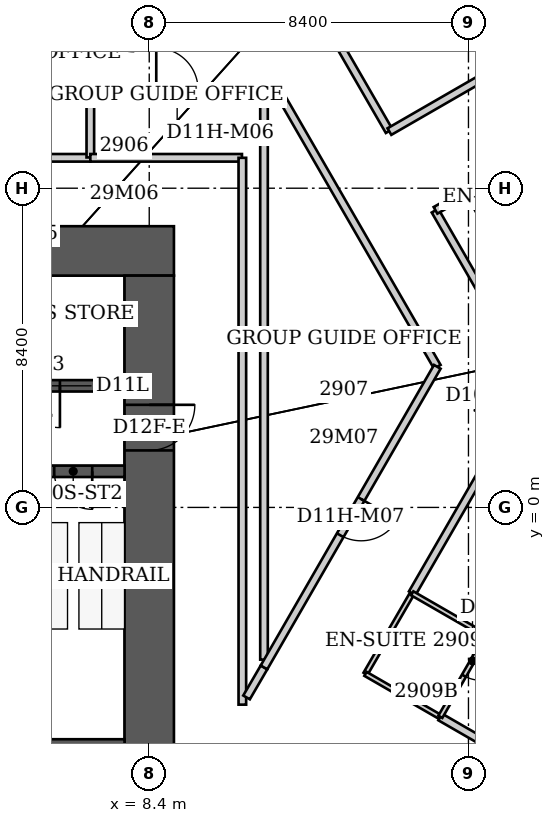
"""IFC4 building model, lengths in metres.
Left out: names, types, materials, properties, quantities, classifications, styles, units other than length and angle.
Written with IfcOpenShell. Run it as: python <this file> out.ifc"""

import sys

from ifc_helpers import new_model, si_unit, direction, frame, frame_2d, origin, place, context, subcontext, project, spatial, rectangle, extrude, element, fill, save


model = new_model("IFC4")
c1 = context("Model", 3, precision=1e-05, world=origin(), true_north=direction((0.0, 1.0)))
c2 = subcontext(c1, "Body", "Model", "MODEL_VIEW")
j1 = project(units=[si_unit("LENGTHUNIT", "METRE"), si_unit("PLANEANGLEUNIT", "RADIAN")], contexts=[c1])
p1 = place(None, origin())
s1 = spatial("IfcSite", under=j1, at=p1, CompositionType="ELEMENT")
p2 = place(p1, origin())
s2 = spatial("IfcBuilding", under=s1, at=p2, CompositionType="ELEMENT")
p3 = place(p2, frame((0.0, 0.0, 119.6)))
s3 = spatial("IfcBuildingStorey", under=s2, at=p3, CompositionType="ELEMENT", Elevation=119.6)
p4 = place(p3, frame((-9.05, 6.75, 0.0), z_axis=(0.0, 0.0, 1.0), x_axis=(1.0, 0.0, 0.0)))
e1 = element("IfcWall", 1, at=p4, inside=s3, PredefinedType="SHEAR", context=c2, shape_type="SweptSolid", body=[
    extrude(rectangle(XDim=18.1, YDim=1.3, at=frame_2d((9.05, 0.0))), origin(), (0.0, 0.0, 1.0), 3.8),
])
p5 = place(p3, frame((8.4, -9.2, 0.0), z_axis=(0.0, 0.0, 1.0), x_axis=(0.0, 1.0, 0.0)))
e2 = element("IfcWall", 2, at=p5, inside=s3, PredefinedType="SHEAR", context=c2, shape_type="SweptSolid", body=[
    extrude(rectangle(XDim=15.3, YDim=1.3, at=frame_2d((7.65, 0.0))), origin(), (0.0, 0.0, 1.0), 3.8),
])
p6 = place(p5, frame((10.7, 0.0, 0.0)))
e3 = element("IfcOpeningElement", 3, at=p6, cuts=e2, PredefinedType="OPENING", context=c2, shape_type="SweptSolid", body=[
    extrude(rectangle(XDim=1.2, YDim=2.2, at=frame_2d((0.6, 1.1))), frame((0.0, 0.65, 0.0), z_axis=(0.0, -1.0, 0.0), x_axis=(1.0, 0.0, 0.0)), (0.0, 0.0, 1.0), 1.3),
])
p7 = place(p3, frame((-7.75, -6.5, 0.0), z_axis=(0.0, 0.0, 1.0), x_axis=(1.0, 0.0, 0.0)))
e4 = element("IfcWall", 4, at=p7, inside=s3, PredefinedType="SHEAR", context=c2, shape_type="SweptSolid", body=[
    extrude(rectangle(XDim=15.5, YDim=0.8, at=frame_2d((7.75, 0.0))), origin(), (0.0, 0.0, 1.0), 3.8),
])
p8 = place(p3, frame((4.75, 0.95, 0.0), z_axis=(0.0, 0.0, 1.0), x_axis=(1.0, 0.0, 0.0)))
e5 = element("IfcWall", 5, at=p8, inside=s3, PredefinedType="SHEAR", context=c2, shape_type="SweptSolid", body=[
    extrude(rectangle(XDim=3.0, YDim=0.3, at=frame_2d((1.5, 0.0))), origin(), (0.0, 0.0, 1.0), 3.8),
])
p9 = place(p8, frame((1.15, 0.0, 0.0)))
e6 = element("IfcOpeningElement", 6, at=p9, cuts=e5, PredefinedType="OPENING", context=c2, shape_type="SweptSolid", body=[
    extrude(rectangle(XDim=1.0, YDim=2.2, at=frame_2d((0.5, 1.1))), frame((0.0, 0.15, 0.0), z_axis=(0.0, -1.0, 0.0), x_axis=(1.0, 0.0, 0.0)), (0.0, 0.0, 1.0), 0.3),
])
p10 = place(p3, frame((-7.75, 3.2, 0.0), z_axis=(0.0, 0.0, 1.0), x_axis=(1.0, 0.0, 0.0)))
e7 = element("IfcWall", 7, at=p10, inside=s3, PredefinedType="SHEAR", context=c2, shape_type="SweptSolid", body=[
    extrude(rectangle(XDim=15.5, YDim=0.3, at=frame_2d((7.75, 0.0))), origin(), (0.0, 0.0, 1.0), 3.8),
])
p11 = place(p10, frame((5.887, 0.0, 0.0)))
e8 = element("IfcOpeningElement", 8, at=p11, cuts=e7, PredefinedType="OPENING", context=c2, shape_type="SweptSolid", body=[
    extrude(rectangle(XDim=1.1, YDim=2.2, at=frame_2d((0.55, 1.1))), frame((0.0, 0.15, 0.0), z_axis=(0.0, -1.0, 0.0), x_axis=(1.0, 0.0, 0.0)), (0.0, 0.0, 1.0), 0.3),
])
p12 = place(p10, frame((8.812, 0.0, 0.0)))
e9 = element("IfcOpeningElement", 9, at=p12, cuts=e7, PredefinedType="OPENING", context=c2, shape_type="SweptSolid", body=[
    extrude(rectangle(XDim=1.1, YDim=2.2, at=frame_2d((0.55, 1.1))), frame((0.0, 0.15, 0.0), z_axis=(0.0, -1.0, 0.0), x_axis=(1.0, 0.0, 0.0)), (0.0, 0.0, 1.0), 0.3),
])
p13 = place(p10, frame((12.7, 0.0, 0.0)))
e10 = element("IfcOpeningElement", 10, at=p13, cuts=e7, PredefinedType="OPENING", context=c2, shape_type="SweptSolid", body=[
    extrude(rectangle(XDim=1.1, YDim=2.2, at=frame_2d((0.55, 1.1))), frame((0.0, 0.15, 0.0), z_axis=(0.0, -1.0, 0.0), x_axis=(1.0, 0.0, 0.0)), (0.0, 0.0, 1.0), 0.3),
])
p14 = place(p3, frame((2.28, 10.99, 0.0), z_axis=(0.0, 0.0, 1.0), x_axis=(1.0, 0.0, 0.0)))
e11 = element("IfcWall", 11, at=p14, inside=s3, PredefinedType="PARTITIONING", context=c2, shape_type="SweptSolid", body=[
    extrude(rectangle(XDim=4.57, YDim=0.2, at=frame_2d((2.285, 0.0))), origin(), (0.0, 0.0, 1.0), 3.64),
])
p15 = place(p14, frame((1.735, 0.0, 0.0)))
e12 = element("IfcOpeningElement", 12, at=p15, cuts=e11, PredefinedType="OPENING", context=c2, shape_type="SweptSolid", body=[
    extrude(rectangle(XDim=1.1, YDim=2.2, at=frame_2d((0.55, 1.1))), frame((0.0, 0.1, 0.0), z_axis=(0.0, -1.0, 0.0), x_axis=(1.0, 0.0, 0.0)), (0.0, 0.0, 1.0), 0.2),
])
p16 = place(p3, frame((6.85, 9.2, 0.0), z_axis=(0.0, 0.0, 1.0), x_axis=(-1.0, 0.0, 0.0)))
e13 = element("IfcWall", 13, at=p16, inside=s3, PredefinedType="PARTITIONING", context=c2, shape_type="SweptSolid", body=[
    extrude(rectangle(XDim=4.57, YDim=0.2, at=frame_2d((2.285, 0.0))), origin(), (0.0, 0.0, 1.0), 3.64),
])
p17 = place(p3, frame((6.85, 10.98, 0.0), z_axis=(0.0, 0.0, 1.0), x_axis=(0.0, -1.0, 0.0)))
e14 = element("IfcWall", 14, at=p17, inside=s3, PredefinedType="PARTITIONING", context=c2, shape_type="SweptSolid", body=[
    extrude(rectangle(XDim=1.77, YDim=0.2, at=frame_2d((0.885, 0.0))), origin(), (0.0, 0.0, 1.0), 3.64),
])
p18 = place(p3, frame((6.85, 10.99, 0.0), z_axis=(0.0, 0.0, 1.0), x_axis=(1.0, 0.0, 0.0)))
e15 = element("IfcWall", 15, at=p18, inside=s3, PredefinedType="PARTITIONING", context=c2, shape_type="SweptSolid", body=[
    extrude(rectangle(XDim=4.57, YDim=0.2, at=frame_2d((2.285, 0.0))), origin(), (0.0, 0.0, 1.0), 3.64),
])
p19 = place(p18, frame((1.735, 0.0, 0.0)))
e16 = element("IfcOpeningElement", 16, at=p19, cuts=e15, PredefinedType="OPENING", context=c2, shape_type="SweptSolid", body=[
    extrude(rectangle(XDim=1.1, YDim=2.2, at=frame_2d((0.55, 1.1))), frame((0.0, 0.1, 0.0), z_axis=(0.0, -1.0, 0.0), x_axis=(1.0, 0.0, 0.0)), (0.0, 0.0, 1.0), 0.2),
])
p20 = place(p3, frame((10.84, 9.2, 0.0), z_axis=(0.0, 0.0, 1.0), x_axis=(-1.0, 0.0, 0.0)))
e17 = element("IfcWall", 17, at=p20, inside=s3, PredefinedType="PARTITIONING", context=c2, shape_type="SweptSolid", body=[
    extrude(rectangle(XDim=3.99, YDim=0.2, at=frame_2d((1.995, 0.0))), origin(), (0.0, 0.0, 1.0), 3.64),
])
p21 = place(p3, frame((10.85, -5.19, 0.0), z_axis=(0.0, 0.0, 1.0), x_axis=(0.0, 1.0, 0.0)))
e18 = element("IfcWall", 18, at=p21, inside=s3, PredefinedType="PARTITIONING", context=c2, shape_type="SweptSolid", body=[
    extrude(rectangle(XDim=14.39, YDim=0.2, at=frame_2d((7.195, 0.0))), origin(), (0.0, 0.0, 1.0), 3.64),
])
p22 = place(p3, frame((11.42, -4.21, 0.0), z_axis=(0.0, 0.0, 1.0), x_axis=(-0.502657614045, -0.8644855829, 0.0)))
e19 = element("IfcWall", 19, at=p22, inside=s3, PredefinedType="PARTITIONING", context=c2, shape_type="SweptSolid", body=[
    extrude(rectangle(XDim=0.914, YDim=0.2, at=frame_2d((0.457, 0.0))), origin(), (0.0, 0.0, 1.0), 3.64),
])
p23 = place(p3, frame((11.42, 10.98, 0.0), z_axis=(0.0, 0.0, 1.0), x_axis=(0.0, -1.0, 0.0)))
e20 = element("IfcWall", 20, at=p23, inside=s3, PredefinedType="PARTITIONING", context=c2, shape_type="SweptSolid", body=[
    extrude(rectangle(XDim=14.985, YDim=0.2, at=frame_2d((7.492, 0.0))), origin(), (0.0, 0.0, 1.0), 3.64),
])
p24 = place(p3, frame((11.42, 10.99, 0.0), z_axis=(0.0, 0.0, 1.0), x_axis=(1.0, 0.0, 0.0)))
e21 = element("IfcWall", 21, at=p24, inside=s3, PredefinedType="PARTITIONING", context=c2, shape_type="SweptSolid", body=[
    extrude(rectangle(XDim=0.35, YDim=0.2, at=frame_2d((0.175, 0.0))), origin(), (0.0, 0.0, 1.0), 3.64),
])
p25 = place(p3, frame((11.77, 10.99, 0.0), z_axis=(0.0, 0.0, 1.0), x_axis=(0.500093981358, -0.865971136822, 0.0)))
e22 = element("IfcWall", 22, at=p25, inside=s3, PredefinedType="PARTITIONING", context=c2, shape_type="SweptSolid", body=[
    extrude(rectangle(XDim=8.418, YDim=0.2, at=frame_2d((4.209, 0.0))), origin(), (0.0, 0.0, 1.0), 3.64),
])
p26 = place(p3, frame((13.005, 12.86, 0.0), z_axis=(0.0, 0.0, 1.0), x_axis=(0.500007161152, -0.866021269252, 0.0)))
e23 = element("IfcWall", 23, at=p26, inside=s3, PredefinedType="PARTITIONING", context=c2, shape_type="SweptSolid", body=[
    extrude(rectangle(XDim=3.415, YDim=0.2, at=frame_2d((1.707, 0.0))), origin(), (0.0, 0.0, 1.0), 3.64),
])
p27 = place(p3, frame((14.09, -4.38, 0.0), z_axis=(0.0, 0.0, 1.0), x_axis=(0.501856726365, 0.86495076519, 0.0)))
e24 = element("IfcWall", 24, at=p27, inside=s3, PredefinedType="PARTITIONING", context=c2, shape_type="SweptSolid", body=[
    extrude(rectangle(XDim=2.451, YDim=0.12, at=frame_2d((1.226, 0.0))), origin(), (0.0, 0.0, 1.0), 3.64),
])
p28 = place(p3, frame((14.09, -4.38, 0.0), z_axis=(0.0, 0.0, 1.0), x_axis=(0.866151579213, -0.499781394038, 0.0)))
e25 = element("IfcWall", 25, at=p28, inside=s3, PredefinedType="PARTITIONING", context=c2, shape_type="SweptSolid", body=[
    extrude(rectangle(XDim=2.271, YDim=0.12, at=frame_2d((1.135, 0.0))), origin(), (0.0, 0.0, 1.0), 3.64),
])
p29 = place(p3, frame((15.32, -2.26, 0.0), z_axis=(0.0, 0.0, 1.0), x_axis=(0.499921709333, 0.866070600204, 0.0)))
e26 = element("IfcWall", 26, at=p29, inside=s3, PredefinedType="PARTITIONING", context=c2, shape_type="SweptSolid", body=[
    extrude(rectangle(XDim=4.561, YDim=0.2, at=frame_2d((2.28, 0.0))), origin(), (0.0, 0.0, 1.0), 3.64),
])
p30 = place(p3, frame((15.92, 7.81, 0.0), z_axis=(0.0, 0.0, 1.0), x_axis=(0.499277611559, -0.866442073422, 0.0)))
e27 = element("IfcWall", 27, at=p30, inside=s3, PredefinedType="PARTITIONING", context=c2, shape_type="SweptSolid", body=[
    extrude(rectangle(XDim=3.104, YDim=0.2, at=frame_2d((1.552, 0.0))), origin(), (0.0, 0.0, 1.0), 3.64),
])
p31 = place(p3, frame((15.933, 7.817, 0.0), z_axis=(0.0, 0.0, 1.0), x_axis=(0.870733094426, 0.491755913305, 0.0)))
e28 = element("IfcWall", 28, at=p31, inside=s3, PredefinedType="PARTITIONING", context=c2, shape_type="SweptSolid", body=[
    extrude(rectangle(XDim=0.961, YDim=0.2, at=frame_2d((0.48, 0.0))), origin(), (0.0, 0.0, 1.0), 3.64),
])
p32 = place(p3, frame((15.98, 3.7, 0.0), z_axis=(0.0, 0.0, 1.0), x_axis=(-0.499446957289, -0.866344467781, 0.0)))
e29 = element("IfcWall", 29, at=p32, inside=s3, PredefinedType="PARTITIONING", context=c2, shape_type="SweptSolid", body=[
    extrude(rectangle(XDim=9.13, YDim=0.2, at=frame_2d((4.565, 0.0))), origin(), (0.0, 0.0, 1.0), 3.64),
])
p33 = place(p32, frame((4.015, 0.0, 0.0)))
e30 = element("IfcOpeningElement", 30, at=p33, cuts=e29, PredefinedType="OPENING", context=c2, shape_type="SweptSolid", body=[
    extrude(rectangle(XDim=1.1, YDim=2.2, at=frame_2d((0.55, 1.1))), frame((0.0, 0.1, 0.0), z_axis=(0.0, -1.0, 0.0), x_axis=(1.0, 0.0, 0.0)), (0.0, 0.0, 1.0), 0.2),
])
p34 = place(p3, frame((16.057, -5.515, 0.0), z_axis=(0.0, 0.0, 1.0), x_axis=(0.866182784606, -0.499727309292, 0.0)))
e31 = element("IfcWall", 31, at=p34, inside=s3, PredefinedType="PARTITIONING", context=c2, shape_type="SweptSolid", body=[
    extrude(rectangle(XDim=5.803, YDim=0.2, at=frame_2d((2.902, 0.0))), origin(), (0.0, 0.0, 1.0), 3.64),
])
p35 = place(p34, frame((2.402, 0.0, 0.0)))
e32 = element("IfcOpeningElement", 32, at=p35, cuts=e31, PredefinedType="OPENING", context=c2, shape_type="SweptSolid", body=[
    extrude(rectangle(XDim=1.0, YDim=2.13, at=frame_2d((0.5, 1.065))), frame((0.0, 0.1, 0.0), z_axis=(0.0, -1.0, 0.0), x_axis=(1.0, 0.0, 0.0)), (0.0, 0.0, 1.0), 0.2),
])
p36 = place(p3, frame((16.06, -5.51, 0.0), z_axis=(0.0, 0.0, 1.0), x_axis=(0.498748634132, 0.866746675766, 0.0)))
e33 = element("IfcWall", 33, at=p36, inside=s3, PredefinedType="PARTITIONING", context=c2, shape_type="SweptSolid", body=[
    extrude(rectangle(XDim=2.446, YDim=0.12, at=frame_2d((1.223, 0.0))), origin(), (0.0, 0.0, 1.0), 3.64),
])
p37 = place(p36, frame((1.246, 0.0, 0.0)))
e34 = element("IfcOpeningElement", 34, at=p37, cuts=e33, PredefinedType="OPENING", context=c2, shape_type="SweptSolid", body=[
    extrude(rectangle(XDim=0.9, YDim=2.03, at=frame_2d((0.45, 1.015))), frame((0.0, 0.06, 0.0), z_axis=(0.0, -1.0, 0.0), x_axis=(1.0, 0.0, 0.0)), (0.0, 0.0, 1.0), 0.12),
])
p38 = place(p3, frame((16.77, 8.29, 0.0), z_axis=(0.0, 0.0, 1.0), x_axis=(0.497527583083, -0.867448156417, 0.0)))
e35 = element("IfcWall", 35, at=p38, inside=s3, PredefinedType="PARTITIONING", context=c2, shape_type="SweptSolid", body=[
    extrude(rectangle(XDim=2.271, YDim=0.12, at=frame_2d((1.135, 0.0))), origin(), (0.0, 0.0, 1.0), 3.64),
])
p39 = place(p3, frame((16.77, 8.29, 0.0), z_axis=(0.0, 0.0, 1.0), x_axis=(0.86507240805, 0.501647016168, 0.0)))
e36 = element("IfcWall", 36, at=p39, inside=s3, PredefinedType="PARTITIONING", context=c2, shape_type="SweptSolid", body=[
    extrude(rectangle(XDim=1.954, YDim=0.12, at=frame_2d((0.977, 0.0))), origin(), (0.0, 0.0, 1.0), 3.64),
])
p40 = place(p3, frame((17.28, -3.39, 0.0), z_axis=(0.0, 0.0, 1.0), x_axis=(-0.86635082644, 0.49943592735, 0.0)))
e37 = element("IfcWall", 37, at=p40, inside=s3, PredefinedType="PARTITIONING", context=c2, shape_type="SweptSolid", body=[
    extrude(rectangle(XDim=2.262, YDim=0.12, at=frame_2d((1.131, 0.0))), origin(), (0.0, 0.0, 1.0), 3.64),
])
p41 = place(p3, frame((23.794, 15.125, 0.0), z_axis=(0.0, 0.0, 1.0), x_axis=(-0.866190629897, -0.499713710718, 0.0)))
e38 = element("IfcWall", 38, at=p41, inside=s3, PredefinedType="PARTITIONING", context=c2, shape_type="SweptSolid", body=[
    extrude(rectangle(XDim=10.476, YDim=0.2, at=frame_2d((5.238, 0.0))), origin(), (0.0, 0.0, 1.0), 3.64),
])
p42 = place(p41, frame((4.738, 0.0, 0.0)))
e39 = element("IfcOpeningElement", 39, at=p42, cuts=e38, PredefinedType="OPENING", context=c2, shape_type="SweptSolid", body=[
    extrude(rectangle(XDim=1.0, YDim=2.13, at=frame_2d((0.5, 1.065))), frame((0.0, 0.1, 0.0), z_axis=(0.0, -1.0, 0.0), x_axis=(1.0, 0.0, 0.0)), (0.0, 0.0, 1.0), 0.2),
])
p43 = place(p37, origin())
e40 = element("IfcDoor", 40, at=p43, inside=s3, OperationType="SINGLE_SWING_RIGHT", PredefinedType="DOOR", context=c2, shape_type="SweptSolid", body=[
    extrude(rectangle(XDim=0.9, YDim=2.03, at=frame_2d((0.45, 1.015))), frame((0.0, 0.025, 0.0), z_axis=(0.0, -1.0, 0.0), x_axis=(1.0, 0.0, 0.0)), (0.0, 0.0, 1.0), 0.05),
])
fill(e34, e40)
p44 = place(p19, origin())
e41 = element("IfcDoor", 41, at=p44, inside=s3, OperationType="SINGLE_SWING_LEFT", PredefinedType="DOOR", context=c2, shape_type="SweptSolid", body=[
    extrude(rectangle(XDim=1.1, YDim=2.2, at=frame_2d((0.55, 1.1))), frame((0.0, 0.025, 0.0), z_axis=(0.0, -1.0, 0.0), x_axis=(1.0, 0.0, 0.0)), (0.0, 0.0, 1.0), 0.05),
])
fill(e16, e41)
p45 = place(p33, origin())
e42 = element("IfcDoor", 42, at=p45, inside=s3, OperationType="SINGLE_SWING_LEFT", PredefinedType="DOOR", context=c2, shape_type="SweptSolid", body=[
    extrude(rectangle(XDim=1.1, YDim=2.2, at=frame_2d((0.55, 1.1))), frame((0.0, 0.025, 0.0), z_axis=(0.0, -1.0, 0.0), x_axis=(1.0, 0.0, 0.0)), (0.0, 0.0, 1.0), 0.05),
])
fill(e30, e42)
p46 = place(p9, origin())
e43 = element("IfcDoor", 43, at=p46, inside=s3, OperationType="SINGLE_SWING_RIGHT", PredefinedType="DOOR", context=c2, shape_type="SweptSolid", body=[
    extrude(rectangle(XDim=1.0, YDim=2.2, at=frame_2d((0.5, 1.1))), frame((0.0, 0.025, 0.0), z_axis=(0.0, -1.0, 0.0), x_axis=(1.0, 0.0, 0.0)), (0.0, 0.0, 1.0), 0.05),
])
fill(e6, e43)
p47 = place(p6, origin())
e44 = element("IfcDoor", 44, at=p47, inside=s3, OperationType="SINGLE_SWING_RIGHT", PredefinedType="DOOR", context=c2, shape_type="SweptSolid", body=[
    extrude(rectangle(XDim=1.2, YDim=2.2, at=frame_2d((0.6, 1.1))), frame((0.0, 0.025, 0.0), z_axis=(0.0, -1.0, 0.0), x_axis=(1.0, 0.0, 0.0)), (0.0, 0.0, 1.0), 0.05),
])
fill(e3, e44)
p48 = place(p13, origin())
e45 = element("IfcDoor", 45, at=p48, inside=s3, OperationType="SINGLE_SWING_RIGHT", PredefinedType="DOOR", context=c2, shape_type="SweptSolid", body=[
    extrude(rectangle(XDim=1.1, YDim=2.2, at=frame_2d((0.55, 1.1))), frame((0.0, 0.025, 0.0), z_axis=(0.0, -1.0, 0.0), x_axis=(1.0, 0.0, 0.0)), (0.0, 0.0, 1.0), 0.05),
])
fill(e10, e45)
save(model, sys.argv[1])
